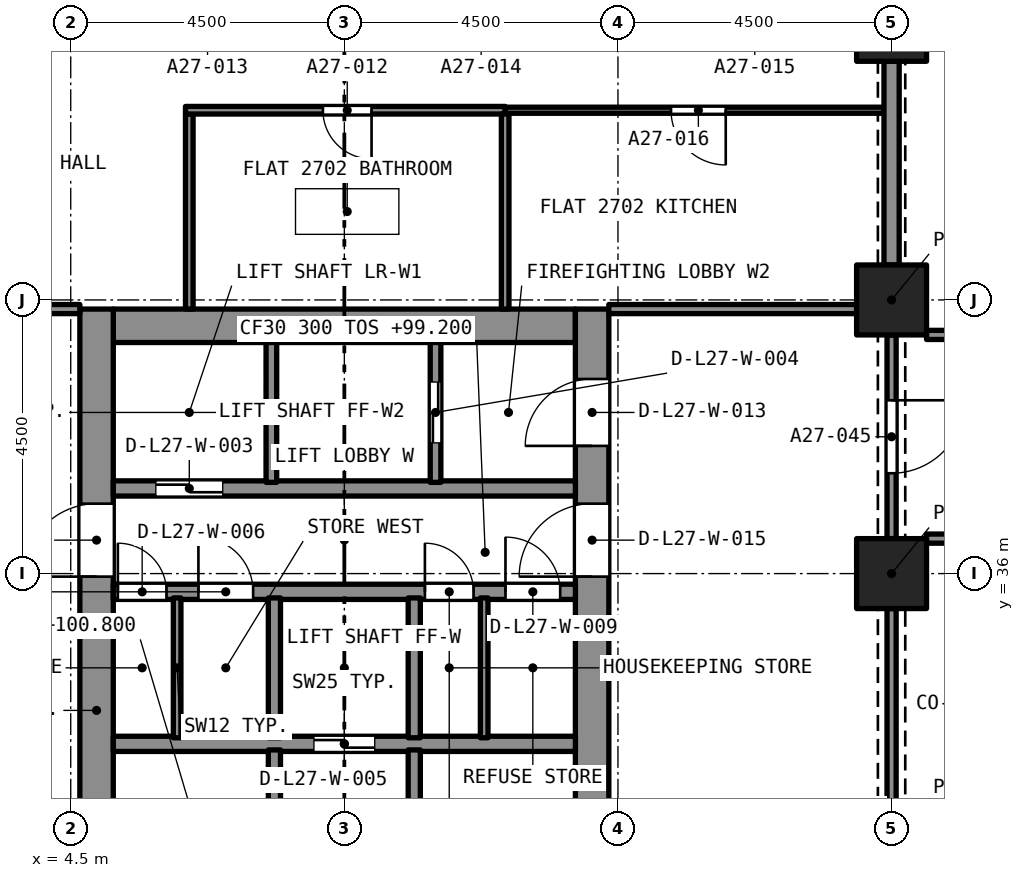
"""IFC4 building model, lengths in metres.
Left out: names, types, materials, properties, quantities, classifications, styles, units other than length and angle.
Written with IfcOpenShell. Run it as: python <this file> out.ifc"""

import sys

from ifc_helpers import new_model, si_unit, direction, frame, frame_2d, origin, origin_2d, place, context, subcontext, project, spatial, rectangle, extrude, element, fill, save


model = new_model("IFC4")
c1 = context("Model", 3, precision=1e-05, world=origin(), true_north=direction((0.0, 1.0)))
c2 = subcontext(c1, "Body", "Model", "MODEL_VIEW")
j1 = project(units=[si_unit("LENGTHUNIT", "METRE"), si_unit("PLANEANGLEUNIT", "RADIAN")], contexts=[c1])
p1 = place(None, origin())
s1 = spatial("IfcSite", under=j1, at=p1, CompositionType="ELEMENT")
p2 = place(p1, origin())
s2 = spatial("IfcBuilding", under=s1, at=p2, CompositionType="ELEMENT")
p3 = place(p2, frame((0.0, 0.0, 99.2)))
s3 = spatial("IfcBuildingStorey", under=s2, at=p3, CompositionType="ELEMENT", Elevation=99.2)
for number, where, z_axis, x_axis in (
    (1, (18.0, 36.0, 0.0), (0.0, 0.0, 1.0), (1.0, 0.0, 0.0)),
    (2, (18.0, 40.5, 0.0), (0.0, 0.0, 1.0), (1.0, 0.0, 0.0)),
    (3, (18.0, 45.0, 0.0), (0.0, 0.0, 1.0), (1.0, 0.0, 0.0)),
):
    element("IfcColumn", number, at=place(p3, frame(where, z_axis=z_axis, x_axis=x_axis)), inside=s3, PredefinedType="COLUMN", context=c2, shape_type="SweptSolid", body=[
        extrude(rectangle(XDim=1.15, YDim=1.15, at=origin_2d()), origin(), (0.0, 0.0, 1.0), 3.2),
    ])
p4 = place(p3, frame((5.2, 40.075, 0.0), z_axis=(0.0, 0.0, 1.0), x_axis=(1.0, 0.0, 0.0)))
e4 = element("IfcWall", 4, at=p4, inside=s3, PredefinedType="SOLIDWALL", context=c2, shape_type="SweptSolid", body=[
    extrude(rectangle(XDim=7.6, YDim=0.55, at=frame_2d((3.8, 0.0))), origin(), (0.0, 0.0, 1.0), 3.2),
])
p5 = place(p3, frame((4.925, 27.15, 0.0), z_axis=(0.0, 0.0, 1.0), x_axis=(0.0, 1.0, 0.0)))
e5 = element("IfcWall", 5, at=p5, inside=s3, PredefinedType="SOLIDWALL", context=c2, shape_type="SweptSolid", body=[
    extrude(rectangle(XDim=13.2, YDim=0.55, at=frame_2d((6.6, 0.0))), origin(), (0.0, 0.0, 1.0), 3.2),
])
p6 = place(p5, frame((8.8, 0.0, 0.0)))
e6 = element("IfcOpeningElement", 6, at=p6, cuts=e5, PredefinedType="OPENING", context=c2, shape_type="SweptSolid", body=[
    extrude(rectangle(XDim=1.2, YDim=2.1, at=frame_2d((0.6, 1.05))), frame((0.0, 0.285, 0.0), z_axis=(0.0, -1.0, 0.0), x_axis=(1.0, 0.0, 0.0)), (0.0, 0.0, 1.0), 0.57),
])
p7 = place(p3, frame((13.075, 27.15, 0.0), z_axis=(0.0, 0.0, 1.0), x_axis=(0.0, 1.0, 0.0)))
e7 = element("IfcWall", 7, at=p7, inside=s3, PredefinedType="SOLIDWALL", context=c2, shape_type="SweptSolid", body=[
    extrude(rectangle(XDim=13.2, YDim=0.55, at=frame_2d((6.6, 0.0))), origin(), (0.0, 0.0, 1.0), 3.2),
])
p8 = place(p7, frame((10.95, 0.0, 0.0)))
e8 = element("IfcOpeningElement", 8, at=p8, cuts=e7, PredefinedType="OPENING", context=c2, shape_type="SweptSolid", body=[
    extrude(rectangle(XDim=1.1, YDim=2.1, at=frame_2d((0.55, 1.05))), frame((0.0, 0.285, 0.0), z_axis=(0.0, -1.0, 0.0), x_axis=(1.0, 0.0, 0.0)), (0.0, 0.0, 1.0), 0.57),
])
p9 = place(p7, frame((8.8, 0.0, 0.0)))
e9 = element("IfcOpeningElement", 9, at=p9, cuts=e7, PredefinedType="OPENING", context=c2, shape_type="SweptSolid", body=[
    extrude(rectangle(XDim=1.2, YDim=2.1, at=frame_2d((0.6, 1.05))), frame((0.0, 0.285, 0.0), z_axis=(0.0, -1.0, 0.0), x_axis=(1.0, 0.0, 0.0)), (0.0, 0.0, 1.0), 0.57),
])
p10 = place(p3, frame((6.45, 40.35, 0.0), z_axis=(0.0, 0.0, 1.0), x_axis=(0.0, 1.0, 0.0)))
e10 = element("IfcWall", 10, at=p10, inside=s3, PredefinedType="PARTITIONING", context=c2, shape_type="SweptSolid", body=[
    extrude(rectangle(XDim=3.208, YDim=0.125, at=frame_2d((1.604, 0.0))), origin(), (0.0, 0.0, 1.0), 2.9),
])
p11 = place(p3, frame((11.645, 43.62, 0.0), z_axis=(0.0, 0.0, 1.0), x_axis=(-1.0, 0.0, 0.0)))
e11 = element("IfcWall", 11, at=p11, inside=s3, PredefinedType="PARTITIONING", context=c2, shape_type="SweptSolid", body=[
    extrude(rectangle(XDim=5.258, YDim=0.125, at=frame_2d((2.629, 0.0))), origin(), (0.0, 0.0, 1.0), 2.9),
])
p12 = place(p11, frame((2.198, 0.0, 0.0)))
e12 = element("IfcOpeningElement", 12, at=p12, cuts=e11, PredefinedType="OPENING", context=c2, shape_type="SweptSolid", body=[
    extrude(rectangle(XDim=0.8, YDim=2.1, at=frame_2d((0.4, 1.05))), frame((0.0, 0.073, 0.0), z_axis=(0.0, -1.0, 0.0), x_axis=(1.0, 0.0, 0.0)), (0.0, 0.0, 1.0), 0.145),
])
p13 = place(p3, frame((11.645, 40.35, 0.0), z_axis=(0.0, 0.0, 1.0), x_axis=(0.0, 1.0, 0.0)))
e13 = element("IfcWall", 13, at=p13, inside=s3, PredefinedType="PARTITIONING", context=c2, shape_type="SweptSolid", body=[
    extrude(rectangle(XDim=3.208, YDim=0.125, at=frame_2d((1.604, 0.0))), origin(), (0.0, 0.0, 1.0), 2.9),
])
p14 = place(p3, frame((17.875, 43.62, 0.0), z_axis=(0.0, 0.0, 1.0), x_axis=(-1.0, 0.0, 0.0)))
e14 = element("IfcWall", 14, at=p14, inside=s3, PredefinedType="PARTITIONING", context=c2, shape_type="SweptSolid", body=[
    extrude(rectangle(XDim=6.23, YDim=0.1, at=frame_2d((3.115, 0.0))), origin(), (0.0, 0.0, 1.0), 2.9),
])
p15 = place(p14, frame((2.602, 0.0, 0.0)))
e15 = element("IfcOpeningElement", 15, at=p15, cuts=e14, PredefinedType="OPENING", context=c2, shape_type="SweptSolid", body=[
    extrude(rectangle(XDim=0.9, YDim=2.1, at=frame_2d((0.45, 1.05))), frame((0.0, 0.06, 0.0), z_axis=(0.0, -1.0, 0.0), x_axis=(1.0, 0.0, 0.0)), (0.0, 0.0, 1.0), 0.12),
])
p16 = place(p3, frame((0.575, 40.35, 0.0), z_axis=(0.0, 0.0, 1.0), x_axis=(1.0, 0.0, 0.0)))
e16 = element("IfcWall", 16, at=p16, inside=s3, PredefinedType="PARTITIONING", context=c2, shape_type="SweptSolid", body=[
    extrude(rectangle(XDim=4.075, YDim=0.15, at=frame_2d((2.038, 0.0))), origin(), (0.0, 0.0, 1.0), 2.9),
])
p17 = place(p16, frame((1.175, 0.0, 0.0)))
e17 = element("IfcOpeningElement", 17, at=p17, cuts=e16, PredefinedType="OPENING", context=c2, shape_type="SweptSolid", body=[
    extrude(rectangle(XDim=1.0, YDim=2.1, at=frame_2d((0.5, 1.05))), frame((0.0, 0.085, 0.0), z_axis=(0.0, -1.0, 0.0), x_axis=(1.0, 0.0, 0.0)), (0.0, 0.0, 1.0), 0.17),
])
p18 = place(p3, frame((18.0, 41.075, 0.0), z_axis=(0.0, 0.0, 1.0), x_axis=(0.0, 1.0, 0.0)))
e18 = element("IfcWall", 18, at=p18, inside=s3, PredefinedType="PARTITIONING", context=c2, shape_type="SweptSolid", body=[
    extrude(rectangle(XDim=3.35, YDim=0.25, at=frame_2d((1.675, 0.0))), origin(), (0.0, 0.0, 1.0), 2.38),
])
p19 = place(p3, frame((13.35, 40.35, 0.0), z_axis=(0.0, 0.0, 1.0), x_axis=(1.0, 0.0, 0.0)))
e19 = element("IfcWall", 19, at=p19, inside=s3, PredefinedType="PARTITIONING", context=c2, shape_type="SweptSolid", body=[
    extrude(rectangle(XDim=4.075, YDim=0.15, at=frame_2d((2.038, 0.0))), origin(), (0.0, 0.0, 1.0), 2.9),
])
p20 = place(p3, frame((18.575, 39.925, 0.0), z_axis=(0.0, 0.0, 1.0), x_axis=(1.0, 0.0, 0.0)))
e20 = element("IfcWall", 20, at=p20, inside=s3, PredefinedType="PARTITIONING", context=c2, shape_type="SweptSolid", body=[
    extrude(rectangle(XDim=8.425, YDim=0.15, at=frame_2d((4.212, 0.0))), origin(), (0.0, 0.0, 1.0), 2.75),
])
p21 = place(p20, frame((3.425, 0.0, 0.0)))
e21 = element("IfcOpeningElement", 21, at=p21, cuts=e20, PredefinedType="OPENING", context=c2, shape_type="SweptSolid", body=[
    extrude(rectangle(XDim=1.0, YDim=2.1, at=frame_2d((0.5, 1.05))), frame((0.0, 0.085, 0.0), z_axis=(0.0, -1.0, 0.0), x_axis=(1.0, 0.0, 0.0)), (0.0, 0.0, 1.0), 0.17),
])
p22 = place(p3, frame((22.5, 36.575, 0.0), z_axis=(0.0, 0.0, 1.0), x_axis=(-1.0, 0.0, 0.0)))
e22 = element("IfcWall", 22, at=p22, inside=s3, PredefinedType="PARTITIONING", context=c2, shape_type="SweptSolid", body=[
    extrude(rectangle(XDim=3.925, YDim=0.15, at=frame_2d((1.962, 0.0))), origin(), (0.0, 0.0, 1.0), 2.75),
])
p23 = place(p22, frame((1.75, 0.0, 0.0)))
e23 = element("IfcOpeningElement", 23, at=p23, cuts=e22, PredefinedType="OPENING", context=c2, shape_type="SweptSolid", body=[
    extrude(rectangle(XDim=1.0, YDim=2.1, at=frame_2d((0.5, 1.05))), frame((0.0, 0.085, 0.0), z_axis=(0.0, -1.0, 0.0), x_axis=(1.0, 0.0, 0.0)), (0.0, 0.0, 1.0), 0.17),
])
p24 = place(p3, frame((18.0, 39.925, 0.0), z_axis=(0.0, 0.0, 1.0), x_axis=(0.0, -1.0, 0.0)))
e24 = element("IfcWall", 24, at=p24, inside=s3, PredefinedType="PARTITIONING", context=c2, shape_type="SweptSolid", body=[
    extrude(rectangle(XDim=3.35, YDim=0.15, at=frame_2d((1.675, 0.0))), origin(), (0.0, 0.0, 1.0), 2.38),
])
p25 = place(p24, frame((1.075, 0.0, 0.0)))
e25 = element("IfcOpeningElement", 25, at=p25, cuts=e24, PredefinedType="OPENING", context=c2, shape_type="SweptSolid", body=[
    extrude(rectangle(XDim=1.2, YDim=2.1, at=frame_2d((0.6, 1.05))), frame((0.0, 0.085, 0.0), z_axis=(0.0, -1.0, 0.0), x_axis=(1.0, 0.0, 0.0)), (0.0, 0.0, 1.0), 0.17),
])
p26 = place(p3, frame((18.0, 32.075, 0.0), z_axis=(0.0, 0.0, 1.0), x_axis=(0.0, 1.0, 0.0)))
e26 = element("IfcWall", 26, at=p26, inside=s3, PredefinedType="PARTITIONING", context=c2, shape_type="SweptSolid", body=[
    extrude(rectangle(XDim=3.35, YDim=0.15, at=frame_2d((1.675, 0.0))), origin(), (0.0, 0.0, 1.0), 2.38),
])
p27 = place(p3, frame((5.2, 33.2, 0.0), z_axis=(0.0, 0.0, 1.0), x_axis=(1.0, 0.0, 0.0)))
e27 = element("IfcWall", 27, at=p27, inside=s3, PredefinedType="SOLIDWALL", context=c2, shape_type="SweptSolid", body=[
    extrude(rectangle(XDim=7.6, YDim=0.25, at=frame_2d((3.8, 0.0))), origin(), (0.0, 0.0, 1.0), 2.9),
])
p28 = place(p27, frame((3.3, 0.0, 0.0)))
e28 = element("IfcOpeningElement", 28, at=p28, cuts=e27, PredefinedType="OPENING", context=c2, shape_type="SweptSolid", body=[
    extrude(rectangle(XDim=1.0, YDim=2.1, at=frame_2d((0.5, 1.05))), frame((0.0, 0.135, 0.0), z_axis=(0.0, -1.0, 0.0), x_axis=(1.0, 0.0, 0.0)), (0.0, 0.0, 1.0), 0.27),
])
p29 = place(p3, frame((5.2, 35.7, 0.0), z_axis=(0.0, 0.0, 1.0), x_axis=(1.0, 0.0, 0.0)))
e29 = element("IfcWall", 29, at=p29, inside=s3, PredefinedType="SOLIDWALL", context=c2, shape_type="SweptSolid", body=[
    extrude(rectangle(XDim=7.6, YDim=0.25, at=frame_2d((3.8, 0.0))), origin(), (0.0, 0.0, 1.0), 2.9),
])
p30 = place(p29, frame((0.075, 0.0, 0.0)))
e30 = element("IfcOpeningElement", 30, at=p30, cuts=e29, PredefinedType="OPENING", context=c2, shape_type="SweptSolid", body=[
    extrude(rectangle(XDim=0.8, YDim=2.1, at=frame_2d((0.4, 1.05))), frame((0.0, 0.135, 0.0), z_axis=(0.0, -1.0, 0.0), x_axis=(1.0, 0.0, 0.0)), (0.0, 0.0, 1.0), 0.27),
])
p31 = place(p29, frame((1.4, 0.0, 0.0)))
e31 = element("IfcOpeningElement", 31, at=p31, cuts=e29, PredefinedType="OPENING", context=c2, shape_type="SweptSolid", body=[
    extrude(rectangle(XDim=0.9, YDim=2.1, at=frame_2d((0.45, 1.05))), frame((0.0, 0.135, 0.0), z_axis=(0.0, -1.0, 0.0), x_axis=(1.0, 0.0, 0.0)), (0.0, 0.0, 1.0), 0.27),
])
p32 = place(p29, frame((5.125, 0.0, 0.0)))
e32 = element("IfcOpeningElement", 32, at=p32, cuts=e29, PredefinedType="OPENING", context=c2, shape_type="SweptSolid", body=[
    extrude(rectangle(XDim=0.8, YDim=2.1, at=frame_2d((0.4, 1.05))), frame((0.0, 0.135, 0.0), z_axis=(0.0, -1.0, 0.0), x_axis=(1.0, 0.0, 0.0)), (0.0, 0.0, 1.0), 0.27),
])
p33 = place(p29, frame((6.45, 0.0, 0.0)))
e33 = element("IfcOpeningElement", 33, at=p33, cuts=e29, PredefinedType="OPENING", context=c2, shape_type="SweptSolid", body=[
    extrude(rectangle(XDim=0.9, YDim=2.1, at=frame_2d((0.45, 1.05))), frame((0.0, 0.135, 0.0), z_axis=(0.0, -1.0, 0.0), x_axis=(1.0, 0.0, 0.0)), (0.0, 0.0, 1.0), 0.27),
])
p34 = place(p3, frame((5.2, 37.4, 0.0), z_axis=(0.0, 0.0, 1.0), x_axis=(1.0, 0.0, 0.0)))
e34 = element("IfcWall", 34, at=p34, inside=s3, PredefinedType="SOLIDWALL", context=c2, shape_type="SweptSolid", body=[
    extrude(rectangle(XDim=7.6, YDim=0.25, at=frame_2d((3.8, 0.0))), origin(), (0.0, 0.0, 1.0), 2.9),
])
p35 = place(p34, frame((0.7, 0.0, 0.0)))
e35 = element("IfcOpeningElement", 35, at=p35, cuts=e34, PredefinedType="OPENING", context=c2, shape_type="SweptSolid", body=[
    extrude(rectangle(XDim=1.1, YDim=2.4, at=frame_2d((0.55, 1.2))), frame((0.0, 0.135, 0.0), z_axis=(0.0, -1.0, 0.0), x_axis=(1.0, 0.0, 0.0)), (0.0, 0.0, 1.0), 0.27),
])
p36 = place(p3, frame((7.85, 27.7, 0.0), z_axis=(0.0, 0.0, 1.0), x_axis=(0.0, 1.0, 0.0)))
e36 = element("IfcWall", 36, at=p36, inside=s3, PredefinedType="SOLIDWALL", context=c2, shape_type="SweptSolid", body=[
    extrude(rectangle(XDim=5.4, YDim=0.2, at=frame_2d((2.7, 0.0))), origin(), (0.0, 0.0, 1.0), 2.9),
])
p37 = place(p36, frame((0.2, 0.0, 0.0)))
e37 = element("IfcOpeningElement", 37, at=p37, cuts=e36, PredefinedType="OPENING", context=c2, shape_type="SweptSolid", body=[
    extrude(rectangle(XDim=0.9, YDim=2.1, at=frame_2d((0.45, 1.05))), frame((0.0, 0.11, 0.0), z_axis=(0.0, -1.0, 0.0), x_axis=(1.0, 0.0, 0.0)), (0.0, 0.0, 1.0), 0.22),
])
p38 = place(p3, frame((10.15, 27.7, 0.0), z_axis=(0.0, 0.0, 1.0), x_axis=(0.0, 1.0, 0.0)))
e38 = element("IfcWall", 38, at=p38, inside=s3, PredefinedType="SOLIDWALL", context=c2, shape_type="SweptSolid", body=[
    extrude(rectangle(XDim=5.4, YDim=0.2, at=frame_2d((2.7, 0.0))), origin(), (0.0, 0.0, 1.0), 2.9),
])
p39 = place(p38, frame((0.2, 0.0, 0.0)))
e39 = element("IfcOpeningElement", 39, at=p39, cuts=e38, PredefinedType="OPENING", context=c2, shape_type="SweptSolid", body=[
    extrude(rectangle(XDim=0.9, YDim=2.1, at=frame_2d((0.45, 1.05))), frame((0.0, 0.11, 0.0), z_axis=(0.0, -1.0, 0.0), x_axis=(1.0, 0.0, 0.0)), (0.0, 0.0, 1.0), 0.22),
])
for number, where, z_axis, x_axis in (
    (40, (7.85, 33.3, 0.0), (0.0, 0.0, 1.0), (0.0, 1.0, 0.0)),
    (41, (10.15, 33.3, 0.0), (0.0, 0.0, 1.0), (0.0, 1.0, 0.0)),
):
    element("IfcWall", number, at=place(p3, frame(where, z_axis=z_axis, x_axis=x_axis)), inside=s3, PredefinedType="SOLIDWALL", context=c2, shape_type="SweptSolid", body=[
        extrude(rectangle(XDim=2.3, YDim=0.2, at=frame_2d((1.15, 0.0))), origin(), (0.0, 0.0, 1.0), 2.9),
    ])
p40 = place(p3, frame((7.8, 37.5, 0.0), z_axis=(0.0, 0.0, 1.0), x_axis=(0.0, 1.0, 0.0)))
e42 = element("IfcWall", 42, at=p40, inside=s3, PredefinedType="SOLIDWALL", context=c2, shape_type="SweptSolid", body=[
    extrude(rectangle(XDim=2.3, YDim=0.175, at=frame_2d((1.15, 0.0))), origin(), (0.0, 0.0, 1.0), 2.9),
])
p41 = place(p3, frame((10.5, 37.5, 0.0), z_axis=(0.0, 0.0, 1.0), x_axis=(0.0, 1.0, 0.0)))
e43 = element("IfcWall", 43, at=p41, inside=s3, PredefinedType="SOLIDWALL", context=c2, shape_type="SweptSolid", body=[
    extrude(rectangle(XDim=2.3, YDim=0.175, at=frame_2d((1.15, 0.0))), origin(), (0.0, 0.0, 1.0), 2.9),
])
p42 = place(p41, frame((0.65, 0.0, 0.0)))
e44 = element("IfcOpeningElement", 44, at=p42, cuts=e43, PredefinedType="OPENING", context=c2, shape_type="SweptSolid", body=[
    extrude(rectangle(XDim=1.0, YDim=2.1, at=frame_2d((0.5, 1.05))), frame((0.0, 0.097, 0.0), z_axis=(0.0, -1.0, 0.0), x_axis=(1.0, 0.0, 0.0)), (0.0, 0.0, 1.0), 0.195),
])
for number, where, z_axis, x_axis in (
    (45, (6.25, 33.3, 0.0), (0.0, 0.0, 1.0), (0.0, 1.0, 0.0)),
    (46, (11.3, 33.3, 0.0), (0.0, 0.0, 1.0), (0.0, 1.0, 0.0)),
):
    element("IfcWall", number, at=place(p3, frame(where, z_axis=z_axis, x_axis=x_axis)), inside=s3, PredefinedType="PARTITIONING", context=c2, shape_type="SweptSolid", body=[
        extrude(rectangle(XDim=2.3, YDim=0.125, at=frame_2d((1.15, 0.0))), origin(), (0.0, 0.0, 1.0), 2.9),
    ])
p43 = place(p12, origin())
e47 = element("IfcDoor", 47, at=p43, inside=s3, OperationType="SINGLE_SWING_LEFT", PredefinedType="DOOR", context=c2, shape_type="SweptSolid", body=[
    extrude(rectangle(XDim=0.8, YDim=2.1, at=frame_2d((0.4, 1.05))), frame((0.0, 0.025, 0.0), z_axis=(0.0, -1.0, 0.0), x_axis=(1.0, 0.0, 0.0)), (0.0, 0.0, 1.0), 0.05),
])
fill(e12, e47)
p44 = place(p15, origin())
e48 = element("IfcDoor", 48, at=p44, inside=s3, OperationType="SINGLE_SWING_LEFT", PredefinedType="DOOR", context=c2, shape_type="SweptSolid", body=[
    extrude(rectangle(XDim=0.9, YDim=2.1, at=frame_2d((0.45, 1.05))), frame((0.0, 0.025, 0.0), z_axis=(0.0, -1.0, 0.0), x_axis=(1.0, 0.0, 0.0)), (0.0, 0.0, 1.0), 0.05),
])
fill(e15, e48)
p45 = place(p25, origin())
e49 = element("IfcDoor", 49, at=p45, inside=s3, OperationType="SINGLE_SWING_LEFT", PredefinedType="DOOR", context=c2, shape_type="SweptSolid", body=[
    extrude(rectangle(XDim=1.2, YDim=2.1, at=frame_2d((0.6, 1.05))), frame((0.0, 0.025, 0.0), z_axis=(0.0, -1.0, 0.0), x_axis=(1.0, 0.0, 0.0)), (0.0, 0.0, 1.0), 0.05),
])
fill(e25, e49)
p46 = place(p35, origin())
e50 = element("IfcDoor", 50, at=p46, inside=s3, OperationType="SLIDING_TO_LEFT", PredefinedType="DOOR", context=c2, shape_type="SweptSolid", body=[
    extrude(rectangle(XDim=1.1, YDim=2.4, at=frame_2d((0.55, 1.2))), frame((0.0, 0.025, 0.0), z_axis=(0.0, -1.0, 0.0), x_axis=(1.0, 0.0, 0.0)), (0.0, 0.0, 1.0), 0.05),
])
fill(e35, e50)
p47 = place(p42, origin())
e51 = element("IfcDoor", 51, at=p47, inside=s3, OperationType="SLIDING_TO_LEFT", PredefinedType="DOOR", context=c2, shape_type="SweptSolid", body=[
    extrude(rectangle(XDim=1.0, YDim=2.1, at=frame_2d((0.5, 1.05))), frame((0.0, 0.025, 0.0), z_axis=(0.0, -1.0, 0.0), x_axis=(1.0, 0.0, 0.0)), (0.0, 0.0, 1.0), 0.05),
])
fill(e44, e51)
p48 = place(p28, origin())
e52 = element("IfcDoor", 52, at=p48, inside=s3, OperationType="SLIDING_TO_LEFT", PredefinedType="DOOR", context=c2, shape_type="SweptSolid", body=[
    extrude(rectangle(XDim=1.0, YDim=2.1, at=frame_2d((0.5, 1.05))), frame((0.0, 0.025, 0.0), z_axis=(0.0, -1.0, 0.0), x_axis=(1.0, 0.0, 0.0)), (0.0, 0.0, 1.0), 0.05),
])
fill(e28, e52)
p49 = place(p30, origin())
e53 = element("IfcDoor", 53, at=p49, inside=s3, OperationType="SINGLE_SWING_LEFT", PredefinedType="DOOR", context=c2, shape_type="SweptSolid", body=[
    extrude(rectangle(XDim=0.8, YDim=2.1, at=frame_2d((0.4, 1.05))), frame((0.0, 0.025, 0.0), z_axis=(0.0, -1.0, 0.0), x_axis=(1.0, 0.0, 0.0)), (0.0, 0.0, 1.0), 0.05),
])
fill(e30, e53)
p50 = place(p31, origin())
e54 = element("IfcDoor", 54, at=p50, inside=s3, OperationType="SINGLE_SWING_LEFT", PredefinedType="DOOR", context=c2, shape_type="SweptSolid", body=[
    extrude(rectangle(XDim=0.9, YDim=2.1, at=frame_2d((0.45, 1.05))), frame((0.0, 0.025, 0.0), z_axis=(0.0, -1.0, 0.0), x_axis=(1.0, 0.0, 0.0)), (0.0, 0.0, 1.0), 0.05),
])
fill(e31, e54)
p51 = place(p32, origin())
e55 = element("IfcDoor", 55, at=p51, inside=s3, OperationType="SINGLE_SWING_LEFT", PredefinedType="DOOR", context=c2, shape_type="SweptSolid", body=[
    extrude(rectangle(XDim=0.8, YDim=2.1, at=frame_2d((0.4, 1.05))), frame((0.0, 0.025, 0.0), z_axis=(0.0, -1.0, 0.0), x_axis=(1.0, 0.0, 0.0)), (0.0, 0.0, 1.0), 0.05),
])
fill(e32, e55)
p52 = place(p33, origin())
e56 = element("IfcDoor", 56, at=p52, inside=s3, OperationType="SINGLE_SWING_LEFT", PredefinedType="DOOR", context=c2, shape_type="SweptSolid", body=[
    extrude(rectangle(XDim=0.9, YDim=2.1, at=frame_2d((0.45, 1.05))), frame((0.0, 0.025, 0.0), z_axis=(0.0, -1.0, 0.0), x_axis=(1.0, 0.0, 0.0)), (0.0, 0.0, 1.0), 0.05),
])
fill(e33, e56)
p53 = place(p8, origin())
e57 = element("IfcDoor", 57, at=p53, inside=s3, OperationType="SINGLE_SWING_LEFT", PredefinedType="DOOR", context=c2, shape_type="SweptSolid", body=[
    extrude(rectangle(XDim=1.1, YDim=2.1, at=frame_2d((0.55, 1.05))), frame((0.0, 0.025, 0.0), z_axis=(0.0, -1.0, 0.0), x_axis=(1.0, 0.0, 0.0)), (0.0, 0.0, 1.0), 0.05),
])
fill(e8, e57)
p54 = place(p6, origin())
e58 = element("IfcDoor", 58, at=p54, inside=s3, OperationType="SINGLE_SWING_LEFT", PredefinedType="DOOR", context=c2, shape_type="SweptSolid", body=[
    extrude(rectangle(XDim=1.2, YDim=2.1, at=frame_2d((0.6, 1.05))), frame((0.0, 0.025, 0.0), z_axis=(0.0, -1.0, 0.0), x_axis=(1.0, 0.0, 0.0)), (0.0, 0.0, 1.0), 0.05),
])
fill(e6, e58)
p55 = place(p9, origin())
e59 = element("IfcDoor", 59, at=p55, inside=s3, OperationType="SINGLE_SWING_LEFT", PredefinedType="DOOR", context=c2, shape_type="SweptSolid", body=[
    extrude(rectangle(XDim=1.2, YDim=2.1, at=frame_2d((0.6, 1.05))), frame((0.0, 0.025, 0.0), z_axis=(0.0, -1.0, 0.0), x_axis=(1.0, 0.0, 0.0)), (0.0, 0.0, 1.0), 0.05),
])
fill(e9, e59)
save(model, sys.argv[1])
